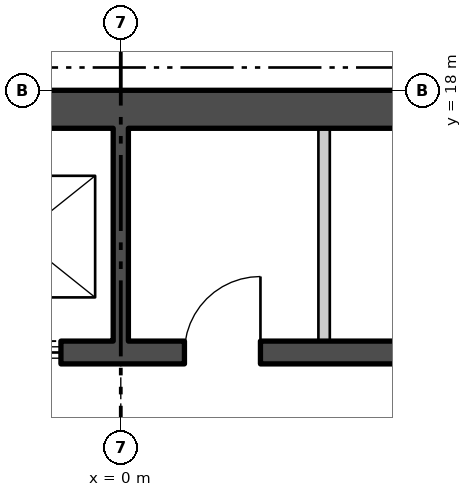
"""IFC4 building model, lengths in metres.
Left out: names, types, materials, properties, quantities, classifications, styles, units other than length and angle.
Written with IfcOpenShell. Run it as: python <this file> out.ifc"""

import sys

from ifc_helpers import new_model, si_unit, direction, frame, frame_2d, origin, place, context, subcontext, project, spatial, rectangle, extrude, element, fill, save


model = new_model("IFC4")
c1 = context("Model", 3, precision=1e-05, world=origin(), true_north=direction((0.0, 1.0)))
c2 = subcontext(c1, "Body", "Model", "MODEL_VIEW")
j1 = project(units=[si_unit("LENGTHUNIT", "METRE"), si_unit("PLANEANGLEUNIT", "RADIAN")], contexts=[c1])
p1 = place(None, origin())
s1 = spatial("IfcSite", under=j1, at=p1, CompositionType="ELEMENT")
p2 = place(p1, origin())
s2 = spatial("IfcBuilding", under=s1, at=p2, CompositionType="ELEMENT")
p3 = place(p2, frame((0.0, 0.0, 174.9)))
s3 = spatial("IfcBuildingStorey", under=s2, at=p3, CompositionType="ELEMENT", Elevation=174.9)
p4 = place(p3, frame((-16.2, 17.75, 0.0), z_axis=(0.0, 0.0, 1.0), x_axis=(1.0, 0.0, 0.0)))
e1 = element("IfcWall", 1, at=p4, inside=s3, PredefinedType="SHEAR", context=c2, shape_type="SweptSolid", body=[
    extrude(rectangle(XDim=32.4, YDim=0.5, at=frame_2d((16.2, 0.0))), origin(), (0.0, 0.0, 1.0), 3.7),
])
p5 = place(p3, frame((-10.7, 14.55, 0.0), z_axis=(0.0, 0.0, 1.0), x_axis=(1.0, 0.0, 0.0)))
e2 = element("IfcWall", 2, at=p5, inside=s3, PredefinedType="SHEAR", context=c2, shape_type="SweptSolid", body=[
    extrude(rectangle(XDim=21.4, YDim=0.3, at=frame_2d((10.7, 0.0))), origin(), (0.0, 0.0, 1.0), 3.7),
])
p6 = place(p5, frame((0.738, 0.0, 0.0)))
e3 = element("IfcOpeningElement", 3, at=p6, cuts=e2, PredefinedType="OPENING", context=c2, shape_type="SweptSolid", body=[
    extrude(rectangle(XDim=1.1, YDim=2.1, at=frame_2d((0.55, 1.05))), frame((0.0, 0.16, 0.0), z_axis=(0.0, -1.0, 0.0), x_axis=(1.0, 0.0, 0.0)), (0.0, 0.0, 1.0), 0.32),
])
p7 = place(p5, frame((3.462, 0.0, 0.0)))
e4 = element("IfcOpeningElement", 4, at=p7, cuts=e2, PredefinedType="OPENING", context=c2, shape_type="SweptSolid", body=[
    extrude(rectangle(XDim=1.1, YDim=2.1, at=frame_2d((0.55, 1.05))), frame((0.0, 0.16, 0.0), z_axis=(0.0, -1.0, 0.0), x_axis=(1.0, 0.0, 0.0)), (0.0, 0.0, 1.0), 0.32),
])
p8 = place(p5, frame((6.138, 0.0, 0.0)))
e5 = element("IfcOpeningElement", 5, at=p8, cuts=e2, PredefinedType="OPENING", context=c2, shape_type="SweptSolid", body=[
    extrude(rectangle(XDim=1.1, YDim=2.1, at=frame_2d((0.55, 1.05))), frame((0.0, 0.16, 0.0), z_axis=(0.0, -1.0, 0.0), x_axis=(1.0, 0.0, 0.0)), (0.0, 0.0, 1.0), 0.32),
])
p9 = place(p5, frame((8.812, 0.0, 0.0)))
e6 = element("IfcOpeningElement", 6, at=p9, cuts=e2, PredefinedType="OPENING", context=c2, shape_type="SweptSolid", body=[
    extrude(rectangle(XDim=1.1, YDim=2.1, at=frame_2d((0.55, 1.05))), frame((0.0, 0.16, 0.0), z_axis=(0.0, -1.0, 0.0), x_axis=(1.0, 0.0, 0.0)), (0.0, 0.0, 1.0), 0.32),
])
p10 = place(p5, frame((19.562, 0.0, 0.0)))
e7 = element("IfcOpeningElement", 7, at=p10, cuts=e2, PredefinedType="OPENING", context=c2, shape_type="SweptSolid", body=[
    extrude(rectangle(XDim=1.1, YDim=2.1, at=frame_2d((0.55, 1.05))), frame((0.0, 0.16, 0.0), z_axis=(0.0, -1.0, 0.0), x_axis=(1.0, 0.0, 0.0)), (0.0, 0.0, 1.0), 0.32),
])
p11 = place(p5, frame((11.537, 0.0, 0.0)))
e8 = element("IfcOpeningElement", 8, at=p11, cuts=e2, PredefinedType="OPENING", context=c2, shape_type="SweptSolid", body=[
    extrude(rectangle(XDim=1.0, YDim=2.1, at=frame_2d((0.5, 1.05))), frame((0.0, 0.16, 0.0), z_axis=(0.0, -1.0, 0.0), x_axis=(1.0, 0.0, 0.0)), (0.0, 0.0, 1.0), 0.32),
])
p12 = place(p5, frame((15.55, 0.0, 0.0)))
e9 = element("IfcOpeningElement", 9, at=p12, cuts=e2, PredefinedType="OPENING", context=c2, shape_type="SweptSolid", body=[
    extrude(rectangle(XDim=1.0, YDim=2.1, at=frame_2d((0.5, 1.05))), frame((0.0, 0.16, 0.0), z_axis=(0.0, -1.0, 0.0), x_axis=(1.0, 0.0, 0.0)), (0.0, 0.0, 1.0), 0.32),
])
p13 = place(p3, frame((0.0, 14.7, 0.0), z_axis=(0.0, 0.0, 1.0), x_axis=(0.0, 1.0, 0.0)))
e10 = element("IfcWall", 10, at=p13, inside=s3, PredefinedType="SHEAR", context=c2, shape_type="SweptSolid", body=[
    extrude(rectangle(XDim=2.8, YDim=0.2, at=frame_2d((1.4, 0.0))), origin(), (0.0, 0.0, 1.0), 3.7),
])
p14 = place(p3, frame((2.675, 14.7, 0.0), z_axis=(0.0, 0.0, 1.0), x_axis=(0.0, 1.0, 0.0)))
e11 = element("IfcWall", 11, at=p14, inside=s3, PredefinedType="PARTITIONING", context=c2, shape_type="SweptSolid", body=[
    extrude(rectangle(XDim=2.8, YDim=0.15, at=frame_2d((1.4, 0.0))), origin(), (0.0, 0.0, 1.0), 3.7),
])
p15 = place(p9, origin())
e12 = element("IfcDoor", 12, at=p15, inside=s3, OperationType="SLIDING_TO_LEFT", PredefinedType="DOOR", context=c2, shape_type="SweptSolid", body=[
    extrude(rectangle(XDim=1.1, YDim=2.1, at=frame_2d((0.55, 1.05))), frame((0.0, 0.025, 0.0), z_axis=(0.0, -1.0, 0.0), x_axis=(1.0, 0.0, 0.0)), (0.0, 0.0, 1.0), 0.05),
])
fill(e6, e12)
p16 = place(p11, origin())
e13 = element("IfcDoor", 13, at=p16, inside=s3, OperationType="SINGLE_SWING_LEFT", PredefinedType="DOOR", context=c2, shape_type="SweptSolid", body=[
    extrude(rectangle(XDim=1.0, YDim=2.1, at=frame_2d((0.5, 1.05))), frame((0.0, 0.025, 0.0), z_axis=(0.0, -1.0, 0.0), x_axis=(1.0, 0.0, 0.0)), (0.0, 0.0, 1.0), 0.05),
])
fill(e8, e13)
save(model, sys.argv[1])
